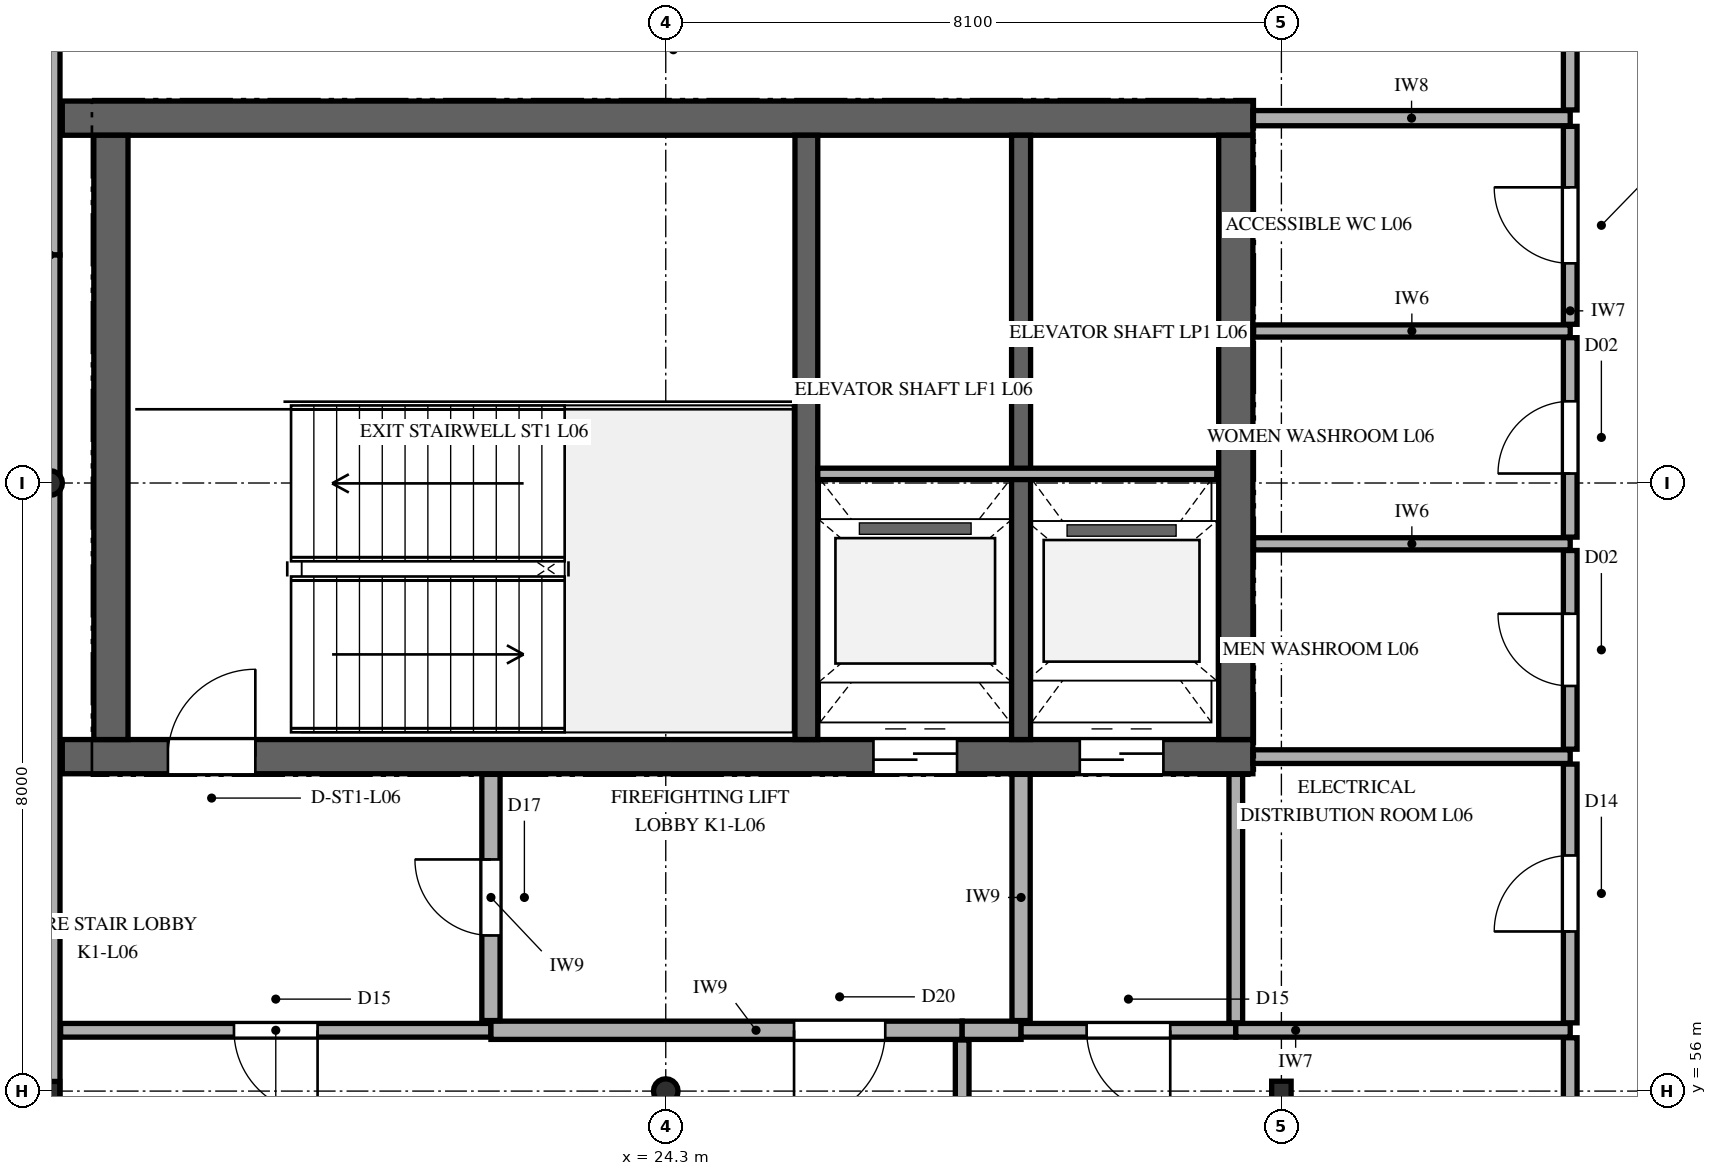
"""IFC4 building model, lengths in metres.
Left out: names, types, materials, properties, quantities, classifications, styles, units other than length and angle.
Written with IfcOpenShell. Run it as: python <this file> out.ifc"""

import sys

from ifc_helpers import new_model, si_unit, direction, frame, frame_2d, origin, origin_2d, place, context, subcontext, project, spatial, rectangle, hollow_rectangle, hollow_circle, i_section, extrude, element, fill, save


model = new_model("IFC4")
c1 = context("Model", 3, precision=1e-05, world=origin(), true_north=direction((0.0, 1.0)))
c2 = subcontext(c1, "Body", "Model", "MODEL_VIEW")
j1 = project(units=[si_unit("LENGTHUNIT", "METRE"), si_unit("PLANEANGLEUNIT", "RADIAN")], contexts=[c1])
p1 = place(None, origin())
s1 = spatial("IfcSite", under=j1, at=p1, CompositionType="ELEMENT")
p2 = place(p1, origin())
s2 = spatial("IfcBuilding", under=s1, at=p2, CompositionType="ELEMENT")
p3 = place(p2, frame((0.0, 0.0, 29.1)))
s3 = spatial("IfcBuildingStorey", under=s2, at=p3, CompositionType="ELEMENT", Elevation=29.1)
p4 = place(p3, frame((16.36, 60.4, 0.0), z_axis=(0.0, 0.0, 1.0), x_axis=(1.0, 0.0, 0.0)))
e1 = element("IfcWall", 1, at=p4, inside=s3, PredefinedType="SHEAR", context=c2, shape_type="SweptSolid", body=[
    extrude(rectangle(XDim=15.665, YDim=0.45, at=frame_2d((7.833, 0.0))), origin(), (0.0, 0.0, 1.0), 4.2),
])
p5 = place(p4, frame((1.39, 0.0, 0.0)))
e2 = element("IfcOpeningElement", 2, at=p5, cuts=e1, PredefinedType="OPENING", context=c2, shape_type="SweptSolid", body=[
    extrude(rectangle(XDim=1.15, YDim=2.25, at=frame_2d((0.575, 1.125))), frame((0.0, 0.235, 0.0), z_axis=(0.0, -1.0, 0.0), x_axis=(1.0, 0.0, 0.0)), (0.0, 0.0, 1.0), 0.47),
])
p6 = place(p4, frame((10.673, 0.0, 0.0)))
e3 = element("IfcOpeningElement", 3, at=p6, cuts=e1, PredefinedType="OPENING", context=c2, shape_type="SweptSolid", body=[
    extrude(rectangle(XDim=1.1, YDim=2.2, at=frame_2d((0.55, 1.1))), frame((0.0, 0.235, 0.0), z_axis=(0.0, -1.0, 0.0), x_axis=(1.0, 0.0, 0.0)), (0.0, 0.0, 1.0), 0.47),
])
p7 = place(p4, frame((13.387, 0.0, 0.0)))
e4 = element("IfcOpeningElement", 4, at=p7, cuts=e1, PredefinedType="OPENING", context=c2, shape_type="SweptSolid", body=[
    extrude(rectangle(XDim=1.1, YDim=2.2, at=frame_2d((0.55, 1.1))), frame((0.0, 0.235, 0.0), z_axis=(0.0, -1.0, 0.0), x_axis=(1.0, 0.0, 0.0)), (0.0, 0.0, 1.0), 0.47),
])
p8 = place(p3, frame((16.36, 68.8, 0.0), z_axis=(0.0, 0.0, 1.0), x_axis=(1.0, 0.0, 0.0)))
e5 = element("IfcWall", 5, at=p8, inside=s3, PredefinedType="SHEAR", context=c2, shape_type="SweptSolid", body=[
    extrude(rectangle(XDim=15.665, YDim=0.45, at=frame_2d((7.833, 0.0))), origin(), (0.0, 0.0, 1.0), 4.2),
])
for number, where, z_axis, x_axis in (
    (6, (17.0, 60.625, 0.0), (0.0, 0.0, 1.0), (0.0, 1.0, 0.0)),
    (7, (31.8, 60.625, 0.0), (0.0, 0.0, 1.0), (0.0, 1.0, 0.0)),
):
    element("IfcWall", number, at=place(p3, frame(where, z_axis=z_axis, x_axis=x_axis)), inside=s3, PredefinedType="SHEAR", context=c2, shape_type="SweptSolid", body=[
        extrude(rectangle(XDim=7.95, YDim=0.45, at=frame_2d((3.975, 0.0))), origin(), (0.0, 0.0, 1.0), 4.2),
    ])
p9 = place(p3, frame((26.15, 60.625, 0.0), z_axis=(0.0, 0.0, 1.0), x_axis=(0.0, 1.0, 0.0)))
e8 = element("IfcWall", 8, at=p9, inside=s3, PredefinedType="SHEAR", context=c2, shape_type="SweptSolid", body=[
    extrude(rectangle(XDim=7.95, YDim=0.3, at=frame_2d((3.975, 0.0))), origin(), (0.0, 0.0, 1.0), 4.2),
])
p10 = place(p3, frame((28.975, 60.625, 0.0), z_axis=(0.0, 0.0, 1.0), x_axis=(0.0, 1.0, 0.0)))
e9 = element("IfcWall", 9, at=p10, inside=s3, PredefinedType="SHEAR", context=c2, shape_type="SweptSolid", body=[
    extrude(rectangle(XDim=7.95, YDim=0.25, at=frame_2d((3.975, 0.0))), origin(), (0.0, 0.0, 1.0), 4.2),
])
p11 = place(p3, frame((16.2, 56.0, 0.0), z_axis=(0.0, 0.0, 1.0), x_axis=(1.0, 0.0, 0.0)))
e10 = element("IfcColumn", 10, at=p11, inside=s3, PredefinedType="COLUMN", context=c2, shape_type="SweptSolid", body=[
    extrude(hollow_rectangle(XDim=0.254, YDim=0.254, WallThickness=0.013, InnerFilletRadius=0.013, OuterFilletRadius=0.025, at=origin_2d()), origin(), (0.0, 0.0, 1.0), 4.2),
])
for number, where, z_axis, x_axis in (
    (11, (16.2, 64.0, 0.0), (0.0, 0.0, 1.0), (1.0, 0.0, 0.0)),
    (12, (24.3, 56.0, 0.0), (0.0, 0.0, 1.0), (1.0, 0.0, 0.0)),
):
    element("IfcColumn", number, at=place(p3, frame(where, z_axis=z_axis, x_axis=x_axis)), inside=s3, PredefinedType="COLUMN", context=c2, shape_type="SweptSolid", body=[
        extrude(hollow_circle(Radius=0.162, WallThickness=0.013, at=origin_2d()), origin(), (0.0, 0.0, 1.0), 4.2),
    ])
p12 = place(p3, frame((32.4, 56.0, 0.0), z_axis=(0.0, 0.0, 1.0), x_axis=(1.0, 0.0, 0.0)))
e13 = element("IfcColumn", 13, at=p12, inside=s3, PredefinedType="COLUMN", context=c2, shape_type="SweptSolid", body=[
    extrude(i_section(OverallWidth=0.256, OverallDepth=0.26, WebThickness=0.011, FlangeThickness=0.017, FilletRadius=0.013, at=origin_2d()), origin(), (0.0, 0.0, 1.0), 4.2),
])
for number, where, z_axis, x_axis in (
    (14, (16.2, 82.0, 0.0), (0.0, 0.0, 1.0), (0.0, -1.0, 0.0)),
    (15, (16.2, 67.0, 0.0), (0.0, 0.0, 1.0), (0.0, -1.0, 0.0)),
):
    element("IfcWall", number, at=place(p3, frame(where, z_axis=z_axis, x_axis=x_axis)), inside=s3, PredefinedType="SOLIDWALL", context=c2, shape_type="SweptSolid", body=[
        extrude(rectangle(XDim=15.0, YDim=0.26, at=frame_2d((7.5, 0.0))), origin(), (0.0, 0.0, 1.0), 3.452),
    ])
p13 = place(p3, frame((26.3, 64.12, 0.0), z_axis=(0.0, 0.0, 1.0), x_axis=(1.0, 0.0, 0.0)))
e16 = element("IfcWall", 16, at=p13, inside=s3, PredefinedType="PARTITIONING", context=c2, shape_type="SweptSolid", body=[
    extrude(rectangle(XDim=5.25, YDim=0.15, at=frame_2d((2.625, 0.0))), origin(), (0.0, 0.0, 1.0), 3.96),
])
p14 = place(p3, frame((16.338, 56.8, 0.0), z_axis=(0.0, 0.0, 1.0), x_axis=(1.0, 0.0, 0.0)))
e17 = element("IfcWall", 17, at=p14, inside=s3, PredefinedType="PARTITIONING", context=c2, shape_type="SweptSolid", body=[
    extrude(rectangle(XDim=5.662, YDim=0.18, at=frame_2d((2.831, 0.0))), origin(), (0.0, 0.0, 1.0), 3.96),
])
p15 = place(p14, frame((2.281, 0.0, 0.0)))
e18 = element("IfcOpeningElement", 18, at=p15, cuts=e17, PredefinedType="OPENING", context=c2, shape_type="SweptSolid", body=[
    extrude(rectangle(XDim=1.1, YDim=2.2, at=frame_2d((0.55, 1.1))), frame((0.0, 0.1, 0.0), z_axis=(0.0, -1.0, 0.0), x_axis=(1.0, 0.0, 0.0)), (0.0, 0.0, 1.0), 0.2),
])
p16 = place(p3, frame((22.0, 56.8, 0.0), z_axis=(0.0, 0.0, 1.0), x_axis=(1.0, 0.0, 0.0)))
e19 = element("IfcWall", 19, at=p16, inside=s3, PredefinedType="PARTITIONING", context=c2, shape_type="SweptSolid", body=[
    extrude(rectangle(XDim=6.2, YDim=0.24, at=frame_2d((3.1, 0.0))), origin(), (0.0, 0.0, 1.0), 3.96),
])
p17 = place(p16, frame((3.988, 0.0, 0.0)))
e20 = element("IfcOpeningElement", 20, at=p17, cuts=e19, PredefinedType="OPENING", context=c2, shape_type="SweptSolid", body=[
    extrude(rectangle(XDim=1.2, YDim=2.3, at=frame_2d((0.6, 1.15))), frame((0.0, 0.13, 0.0), z_axis=(0.0, -1.0, 0.0), x_axis=(1.0, 0.0, 0.0)), (0.0, 0.0, 1.0), 0.26),
])
p18 = place(p3, frame((28.2, 56.8, 0.0), z_axis=(0.0, 0.0, 1.0), x_axis=(1.0, 0.0, 0.0)))
e21 = element("IfcWall", 21, at=p18, inside=s3, PredefinedType="PARTITIONING", context=c2, shape_type="SweptSolid", body=[
    extrude(rectangle(XDim=0.775, YDim=0.24, at=frame_2d((0.388, 0.0))), origin(), (0.0, 0.0, 1.0), 3.96),
])
p19 = place(p3, frame((28.975, 56.8, 0.0), z_axis=(0.0, 0.0, 1.0), x_axis=(1.0, 0.0, 0.0)))
e22 = element("IfcWall", 22, at=p19, inside=s3, PredefinedType="PARTITIONING", context=c2, shape_type="SweptSolid", body=[
    extrude(rectangle(XDim=2.825, YDim=0.18, at=frame_2d((1.413, 0.0))), origin(), (0.0, 0.0, 1.0), 3.96),
])
p20 = place(p19, frame((0.863, 0.0, 0.0)))
e23 = element("IfcOpeningElement", 23, at=p20, cuts=e22, PredefinedType="OPENING", context=c2, shape_type="SweptSolid", body=[
    extrude(rectangle(XDim=1.1, YDim=2.2, at=frame_2d((0.55, 1.1))), frame((0.0, 0.1, 0.0), z_axis=(0.0, -1.0, 0.0), x_axis=(1.0, 0.0, 0.0)), (0.0, 0.0, 1.0), 0.2),
])
p21 = place(p3, frame((31.8, 56.8, 0.0), z_axis=(0.0, 0.0, 1.0), x_axis=(1.0, 0.0, 0.0)))
e24 = element("IfcWall", 24, at=p21, inside=s3, PredefinedType="PARTITIONING", context=c2, shape_type="SweptSolid", body=[
    extrude(rectangle(XDim=4.4, YDim=0.18, at=frame_2d((2.2, 0.0))), origin(), (0.0, 0.0, 1.0), 3.96),
])
p22 = place(p3, frame((32.025, 60.4, 0.0), z_axis=(0.0, 0.0, 1.0), x_axis=(1.0, 0.0, 0.0)))
e25 = element("IfcWall", 25, at=p22, inside=s3, PredefinedType="PARTITIONING", context=c2, shape_type="SweptSolid", body=[
    extrude(rectangle(XDim=4.175, YDim=0.18, at=frame_2d((2.087, 0.0))), origin(), (0.0, 0.0, 1.0), 3.96),
])
for number, where, z_axis, x_axis in (
    (26, (32.033, 63.2, 0.0), (0.0, 0.0, 1.0), (1.0, 0.0, 0.0)),
    (27, (32.033, 66.0, 0.0), (0.0, 0.0, 1.0), (1.0, 0.0, 0.0)),
):
    element("IfcWall", number, at=place(p3, frame(where, z_axis=z_axis, x_axis=x_axis)), inside=s3, PredefinedType="PARTITIONING", context=c2, shape_type="SweptSolid", body=[
        extrude(rectangle(XDim=4.167, YDim=0.16, at=frame_2d((2.083, 0.0))), origin(), (0.0, 0.0, 1.0), 3.96),
    ])
p23 = place(p3, frame((32.025, 68.8, 0.0), z_axis=(0.0, 0.0, 1.0), x_axis=(1.0, 0.0, 0.0)))
e28 = element("IfcWall", 28, at=p23, inside=s3, PredefinedType="PARTITIONING", context=c2, shape_type="SweptSolid", body=[
    extrude(rectangle(XDim=4.175, YDim=0.2, at=frame_2d((2.087, 0.0))), origin(), (0.0, 0.0, 1.0), 3.96),
])
p24 = place(p3, frame((22.0, 56.928, 0.0), z_axis=(0.0, 0.0, 1.0), x_axis=(0.0, 1.0, 0.0)))
e29 = element("IfcWall", 29, at=p24, inside=s3, PredefinedType="PARTITIONING", context=c2, shape_type="SweptSolid", body=[
    extrude(rectangle(XDim=3.239, YDim=0.24, at=frame_2d((1.62, 0.0))), origin(), (0.0, 0.0, 1.0), 3.96),
])
p25 = place(p24, frame((1.119, 0.0, 0.0)))
e30 = element("IfcOpeningElement", 30, at=p25, cuts=e29, PredefinedType="OPENING", context=c2, shape_type="SweptSolid", body=[
    extrude(rectangle(XDim=1.0, YDim=2.2, at=frame_2d((0.5, 1.1))), frame((0.0, 0.13, 0.0), z_axis=(0.0, -1.0, 0.0), x_axis=(1.0, 0.0, 0.0)), (0.0, 0.0, 1.0), 0.26),
])
p26 = place(p3, frame((28.2, 52.138, 0.0), z_axis=(0.0, 0.0, 1.0), x_axis=(0.0, 1.0, 0.0)))
e31 = element("IfcWall", 31, at=p26, inside=s3, PredefinedType="PARTITIONING", context=c2, shape_type="SweptSolid", body=[
    extrude(rectangle(XDim=4.534, YDim=0.18, at=frame_2d((2.267, 0.0))), origin(), (0.0, 0.0, 1.0), 3.96),
])
p27 = place(p26, frame((1.767, 0.0, 0.0)))
e32 = element("IfcOpeningElement", 32, at=p27, cuts=e31, PredefinedType="OPENING", context=c2, shape_type="SweptSolid", body=[
    extrude(rectangle(XDim=1.0, YDim=2.2, at=frame_2d((0.5, 1.1))), frame((0.0, 0.1, 0.0), z_axis=(0.0, -1.0, 0.0), x_axis=(1.0, 0.0, 0.0)), (0.0, 0.0, 1.0), 0.2),
])
p28 = place(p3, frame((28.975, 56.928, 0.0), z_axis=(0.0, 0.0, 1.0), x_axis=(0.0, 1.0, 0.0)))
e33 = element("IfcWall", 33, at=p28, inside=s3, PredefinedType="PARTITIONING", context=c2, shape_type="SweptSolid", body=[
    extrude(rectangle(XDim=3.239, YDim=0.24, at=frame_2d((1.62, 0.0))), origin(), (0.0, 0.0, 1.0), 3.96),
])
p29 = place(p3, frame((31.8, 56.898, 0.0), z_axis=(0.0, 0.0, 1.0), x_axis=(0.0, 1.0, 0.0)))
e34 = element("IfcWall", 34, at=p29, inside=s3, PredefinedType="PARTITIONING", context=c2, shape_type="SweptSolid", body=[
    extrude(rectangle(XDim=3.269, YDim=0.18, at=frame_2d((1.635, 0.0))), origin(), (0.0, 0.0, 1.0), 3.96),
])
p30 = place(p3, frame((36.2, 52.138, 0.0), z_axis=(0.0, 0.0, 1.0), x_axis=(0.0, 1.0, 0.0)))
e35 = element("IfcWall", 35, at=p30, inside=s3, PredefinedType="PARTITIONING", context=c2, shape_type="SweptSolid", body=[
    extrude(rectangle(XDim=4.564, YDim=0.18, at=frame_2d((2.282, 0.0))), origin(), (0.0, 0.0, 1.0), 3.96),
])
p31 = place(p30, frame((1.732, 0.0, 0.0)))
e36 = element("IfcOpeningElement", 36, at=p31, cuts=e35, PredefinedType="OPENING", context=c2, shape_type="SweptSolid", body=[
    extrude(rectangle(XDim=1.1, YDim=2.2, at=frame_2d((0.55, 1.1))), frame((0.0, 0.1, 0.0), z_axis=(0.0, -1.0, 0.0), x_axis=(1.0, 0.0, 0.0)), (0.0, 0.0, 1.0), 0.2),
])
p32 = place(p3, frame((36.2, 56.898, 0.0), z_axis=(0.0, 0.0, 1.0), x_axis=(0.0, 1.0, 0.0)))
e37 = element("IfcWall", 37, at=p32, inside=s3, PredefinedType="PARTITIONING", context=c2, shape_type="SweptSolid", body=[
    extrude(rectangle(XDim=3.404, YDim=0.18, at=frame_2d((1.702, 0.0))), origin(), (0.0, 0.0, 1.0), 3.96),
])
p33 = place(p32, frame((1.202, 0.0, 0.0)))
e38 = element("IfcOpeningElement", 38, at=p33, cuts=e37, PredefinedType="OPENING", context=c2, shape_type="SweptSolid", body=[
    extrude(rectangle(XDim=1.0, YDim=2.15, at=frame_2d((0.5, 1.075))), frame((0.0, 0.1, 0.0), z_axis=(0.0, -1.0, 0.0), x_axis=(1.0, 0.0, 0.0)), (0.0, 0.0, 1.0), 0.2),
])
p34 = place(p3, frame((36.2, 60.498, 0.0), z_axis=(0.0, 0.0, 1.0), x_axis=(0.0, 1.0, 0.0)))
e39 = element("IfcWall", 39, at=p34, inside=s3, PredefinedType="PARTITIONING", context=c2, shape_type="SweptSolid", body=[
    extrude(rectangle(XDim=2.614, YDim=0.18, at=frame_2d((1.307, 0.0))), origin(), (0.0, 0.0, 1.0), 3.96),
])
p35 = place(p34, frame((0.832, 0.0, 0.0)))
e40 = element("IfcOpeningElement", 40, at=p35, cuts=e39, PredefinedType="OPENING", context=c2, shape_type="SweptSolid", body=[
    extrude(rectangle(XDim=0.95, YDim=2.1, at=frame_2d((0.475, 1.05))), frame((0.0, 0.1, 0.0), z_axis=(0.0, -1.0, 0.0), x_axis=(1.0, 0.0, 0.0)), (0.0, 0.0, 1.0), 0.2),
])
p36 = place(p3, frame((36.2, 63.288, 0.0), z_axis=(0.0, 0.0, 1.0), x_axis=(0.0, 1.0, 0.0)))
e41 = element("IfcWall", 41, at=p36, inside=s3, PredefinedType="PARTITIONING", context=c2, shape_type="SweptSolid", body=[
    extrude(rectangle(XDim=2.624, YDim=0.18, at=frame_2d((1.312, 0.0))), origin(), (0.0, 0.0, 1.0), 3.96),
])
p37 = place(p36, frame((0.837, 0.0, 0.0)))
e42 = element("IfcOpeningElement", 42, at=p37, cuts=e41, PredefinedType="OPENING", context=c2, shape_type="SweptSolid", body=[
    extrude(rectangle(XDim=0.95, YDim=2.1, at=frame_2d((0.475, 1.05))), frame((0.0, 0.1, 0.0), z_axis=(0.0, -1.0, 0.0), x_axis=(1.0, 0.0, 0.0)), (0.0, 0.0, 1.0), 0.2),
])
p38 = place(p3, frame((36.2, 66.088, 0.0), z_axis=(0.0, 0.0, 1.0), x_axis=(0.0, 1.0, 0.0)))
e43 = element("IfcWall", 43, at=p38, inside=s3, PredefinedType="PARTITIONING", context=c2, shape_type="SweptSolid", body=[
    extrude(rectangle(XDim=2.604, YDim=0.18, at=frame_2d((1.302, 0.0))), origin(), (0.0, 0.0, 1.0), 3.96),
])
p39 = place(p38, frame((0.802, 0.0, 0.0)))
e44 = element("IfcOpeningElement", 44, at=p39, cuts=e43, PredefinedType="OPENING", context=c2, shape_type="SweptSolid", body=[
    extrude(rectangle(XDim=1.0, YDim=2.15, at=frame_2d((0.5, 1.075))), frame((0.0, 0.1, 0.0), z_axis=(0.0, -1.0, 0.0), x_axis=(1.0, 0.0, 0.0)), (0.0, 0.0, 1.0), 0.2),
])
p40 = place(p3, frame((36.2, 68.908, 0.0), z_axis=(0.0, 0.0, 1.0), x_axis=(0.0, 1.0, 0.0)))
e45 = element("IfcWall", 45, at=p40, inside=s3, PredefinedType="PARTITIONING", context=c2, shape_type="SweptSolid", body=[
    extrude(rectangle(XDim=11.484, YDim=0.18, at=frame_2d((5.742, 0.0))), origin(), (0.0, 0.0, 1.0), 3.598),
])
p41 = place(p40, frame((5.192, 0.0, 0.0)))
e46 = element("IfcOpeningElement", 46, at=p41, cuts=e45, PredefinedType="OPENING", context=c2, shape_type="SweptSolid", body=[
    extrude(rectangle(XDim=1.1, YDim=2.2, at=frame_2d((0.55, 1.1))), frame((0.0, 0.1, 0.0), z_axis=(0.0, -1.0, 0.0), x_axis=(1.0, 0.0, 0.0)), (0.0, 0.0, 1.0), 0.2),
])
p42 = place(p5, origin())
e47 = element("IfcDoor", 47, at=p42, inside=s3, OperationType="SINGLE_SWING_RIGHT", PredefinedType="DOOR", context=c2, shape_type="SweptSolid", body=[
    extrude(rectangle(XDim=1.15, YDim=2.25, at=frame_2d((0.575, 1.125))), frame((0.0, 0.025, 0.0), z_axis=(0.0, -1.0, 0.0), x_axis=(1.0, 0.0, 0.0)), (0.0, 0.0, 1.0), 0.05),
])
fill(e2, e47)
p43 = place(p6, frame((1.1, 0.0, 0.0), z_axis=(0.0, 0.0, 1.0), x_axis=(-1.0, 0.0, 0.0)))
e48 = element("IfcDoor", 48, at=p43, inside=s3, OperationType="DOUBLE_DOOR_SLIDING", PredefinedType="DOOR", context=c2, shape_type="SweptSolid", body=[
    extrude(rectangle(XDim=1.1, YDim=2.2, at=frame_2d((0.55, 1.1))), frame((0.0, 0.025, 0.0), z_axis=(0.0, -1.0, 0.0), x_axis=(1.0, 0.0, 0.0)), (0.0, 0.0, 1.0), 0.05),
])
fill(e3, e48)
p44 = place(p7, frame((1.1, 0.0, 0.0), z_axis=(0.0, 0.0, 1.0), x_axis=(-1.0, 0.0, 0.0)))
e49 = element("IfcDoor", 49, at=p44, inside=s3, OperationType="DOUBLE_DOOR_SLIDING", PredefinedType="DOOR", context=c2, shape_type="SweptSolid", body=[
    extrude(rectangle(XDim=1.1, YDim=2.2, at=frame_2d((0.55, 1.1))), frame((0.0, 0.025, 0.0), z_axis=(0.0, -1.0, 0.0), x_axis=(1.0, 0.0, 0.0)), (0.0, 0.0, 1.0), 0.05),
])
fill(e4, e49)
p45 = place(p15, frame((1.1, 0.0, 0.0), z_axis=(0.0, 0.0, 1.0), x_axis=(-1.0, 0.0, 0.0)))
e50 = element("IfcDoor", 50, at=p45, inside=s3, OperationType="SINGLE_SWING_RIGHT", PredefinedType="DOOR", context=c2, shape_type="SweptSolid", body=[
    extrude(rectangle(XDim=1.1, YDim=2.2, at=frame_2d((0.55, 1.1))), frame((0.0, 0.025, 0.0), z_axis=(0.0, -1.0, 0.0), x_axis=(1.0, 0.0, 0.0)), (0.0, 0.0, 1.0), 0.05),
])
fill(e18, e50)
p46 = place(p17, frame((1.2, 0.0, 0.0), z_axis=(0.0, 0.0, 1.0), x_axis=(-1.0, 0.0, 0.0)))
e51 = element("IfcDoor", 51, at=p46, inside=s3, OperationType="SINGLE_SWING_LEFT", PredefinedType="DOOR", context=c2, shape_type="SweptSolid", body=[
    extrude(rectangle(XDim=1.2, YDim=2.3, at=frame_2d((0.6, 1.15))), frame((0.0, 0.025, 0.0), z_axis=(0.0, -1.0, 0.0), x_axis=(1.0, 0.0, 0.0)), (0.0, 0.0, 1.0), 0.05),
])
fill(e20, e51)
p47 = place(p20, frame((1.1, 0.0, 0.0), z_axis=(0.0, 0.0, 1.0), x_axis=(-1.0, 0.0, 0.0)))
e52 = element("IfcDoor", 52, at=p47, inside=s3, OperationType="SINGLE_SWING_RIGHT", PredefinedType="DOOR", context=c2, shape_type="SweptSolid", body=[
    extrude(rectangle(XDim=1.1, YDim=2.2, at=frame_2d((0.55, 1.1))), frame((0.0, 0.025, 0.0), z_axis=(0.0, -1.0, 0.0), x_axis=(1.0, 0.0, 0.0)), (0.0, 0.0, 1.0), 0.05),
])
fill(e23, e52)
p48 = place(p25, origin())
e53 = element("IfcDoor", 53, at=p48, inside=s3, OperationType="SINGLE_SWING_RIGHT", PredefinedType="DOOR", context=c2, shape_type="SweptSolid", body=[
    extrude(rectangle(XDim=1.0, YDim=2.2, at=frame_2d((0.5, 1.1))), frame((0.0, 0.025, 0.0), z_axis=(0.0, -1.0, 0.0), x_axis=(1.0, 0.0, 0.0)), (0.0, 0.0, 1.0), 0.05),
])
fill(e30, e53)
p49 = place(p33, origin())
e54 = element("IfcDoor", 54, at=p49, inside=s3, OperationType="SINGLE_SWING_LEFT", PredefinedType="DOOR", context=c2, shape_type="SweptSolid", body=[
    extrude(rectangle(XDim=1.0, YDim=2.15, at=frame_2d((0.5, 1.075))), frame((0.0, 0.025, 0.0), z_axis=(0.0, -1.0, 0.0), x_axis=(1.0, 0.0, 0.0)), (0.0, 0.0, 1.0), 0.05),
])
fill(e38, e54)
p50 = place(p35, origin())
e55 = element("IfcDoor", 55, at=p50, inside=s3, OperationType="SINGLE_SWING_RIGHT", PredefinedType="DOOR", context=c2, shape_type="SweptSolid", body=[
    extrude(rectangle(XDim=0.95, YDim=2.1, at=frame_2d((0.475, 1.05))), frame((0.0, 0.025, 0.0), z_axis=(0.0, -1.0, 0.0), x_axis=(1.0, 0.0, 0.0)), (0.0, 0.0, 1.0), 0.05),
])
fill(e40, e55)
p51 = place(p37, origin())
e56 = element("IfcDoor", 56, at=p51, inside=s3, OperationType="SINGLE_SWING_LEFT", PredefinedType="DOOR", context=c2, shape_type="SweptSolid", body=[
    extrude(rectangle(XDim=0.95, YDim=2.1, at=frame_2d((0.475, 1.05))), frame((0.0, 0.025, 0.0), z_axis=(0.0, -1.0, 0.0), x_axis=(1.0, 0.0, 0.0)), (0.0, 0.0, 1.0), 0.05),
])
fill(e42, e56)
p52 = place(p39, origin())
e57 = element("IfcDoor", 57, at=p52, inside=s3, OperationType="SINGLE_SWING_RIGHT", PredefinedType="DOOR", context=c2, shape_type="SweptSolid", body=[
    extrude(rectangle(XDim=1.0, YDim=2.15, at=frame_2d((0.5, 1.075))), frame((0.0, 0.025, 0.0), z_axis=(0.0, -1.0, 0.0), x_axis=(1.0, 0.0, 0.0)), (0.0, 0.0, 1.0), 0.05),
])
fill(e44, e57)
save(model, sys.argv[1])
